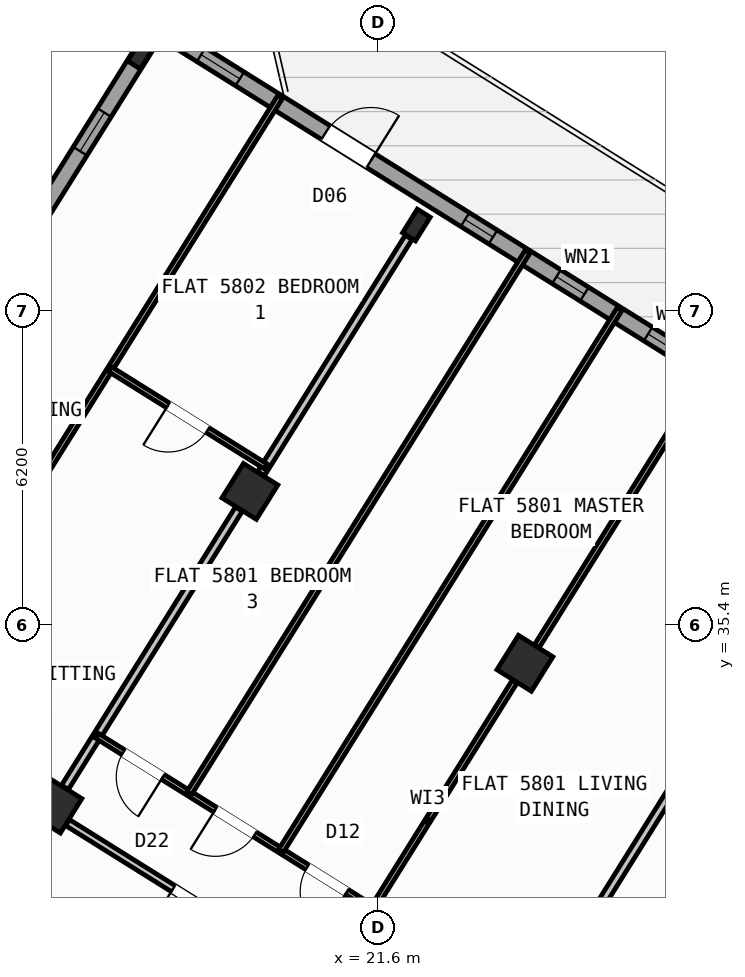
"""IFC4 building model, lengths in metres.
Left out: names, types, materials, properties, quantities, classifications, styles, units other than length and angle.
Written with IfcOpenShell. Run it as: python <this file> out.ifc"""

import sys

from ifc_helpers import new_model, si_unit, direction, frame, frame_2d, origin, origin_2d, place, context, subcontext, project, spatial, rectangle, hollow_rectangle, i_section, extrude, source, transform, mapped, element, fill, save


model = new_model("IFC4")
c1 = context("Model", 3, precision=1e-05, world=origin(), true_north=direction((0.0, 1.0)))
c2 = subcontext(c1, "Body", "Model", "MODEL_VIEW")
j1 = project(units=[si_unit("LENGTHUNIT", "METRE"), si_unit("PLANEANGLEUNIT", "RADIAN")], contexts=[c1])
p1 = place(None, origin())
s1 = spatial("IfcSite", under=j1, at=p1, CompositionType="ELEMENT")
p2 = place(p1, origin())
s2 = spatial("IfcBuilding", under=s1, at=p2, CompositionType="ELEMENT")
p3 = place(p2, frame((0.0, 0.0, 229.2)))
s3 = spatial("IfcBuildingStorey", under=s2, at=p3, CompositionType="ELEMENT", Elevation=229.2)
m1 = source(origin(), c2, "Body", "SweptSolid", [
    extrude(hollow_rectangle(XDim=0.8, YDim=0.8, WallThickness=0.032, at=origin_2d()), origin(), (0.0, 0.0, 1.0), 4.5),
])
p4 = place(p3, frame((24.5, 34.643, 0.0), z_axis=(0.0, 0.0, 1.0), x_axis=(-0.848048096156, 0.529919264233, 0.0)))
e1 = element("IfcColumn", 1, at=p4, inside=s3, PredefinedType="COLUMN", context=c2, shape_type="MappedRepresentation", body=[
    mapped(m1, transform((0.0, 0.0, 0.0), scale=1.0)),
])
m2 = source(origin(), c2, "Body", "SweptSolid", [
    extrude(i_section(OverallWidth=0.3, OverallDepth=0.55, WebThickness=0.015, FlangeThickness=0.029, at=origin_2d()), origin(), (0.0, 0.0, 1.0), 4.5),
])
p5 = place(p3, frame((22.358, 43.292, 0.0), z_axis=(0.0, 0.0, 1.0), x_axis=(-0.848048096156, 0.529919264233, 0.0)))
e2 = element("IfcColumn", 2, at=p5, inside=s3, PredefinedType="COLUMN", context=c2, shape_type="MappedRepresentation", body=[
    mapped(m2, transform((0.0, 0.0, 0.0), scale=1.0)),
])
for number, where, z_axis, x_axis in (
    (3, (19.073, 38.034, 0.0), (0.0, 0.0, 1.0), (-0.848, 0.53, 0.0)),
    (4, (15.205, 31.844, 0.0), (0.0, 0.0, 1.0), (-0.848, 0.53, 0.0)),
):
    element("IfcColumn", number, at=place(p3, frame(where, z_axis=z_axis, x_axis=x_axis)), inside=s3, PredefinedType="COLUMN", context=c2, shape_type="MappedRepresentation", body=[
        mapped(m1, transform((0.0, 0.0, 0.0), scale=1.0)),
    ])
p6 = place(p3, frame((16.931, 46.684, 0.0), z_axis=(0.0, 0.0, 1.0), x_axis=(-0.848048096156, 0.529919264233, 0.0)))
e5 = element("IfcColumn", 5, at=p6, inside=s3, PredefinedType="COLUMN", context=c2, shape_type="MappedRepresentation", body=[
    mapped(m2, transform((0.0, 0.0, 0.0), scale=1.0)),
])
p7 = place(p3, frame((5.7, 28.71, 0.0), z_axis=(0.0, 0.0, 1.0), x_axis=(0.529923711467, 0.8480453172, 0.0)))
e6 = element("IfcWall", 6, at=p7, inside=s3, PredefinedType="STANDARD", context=c2, shape_type="SweptSolid", body=[
    extrude(rectangle(XDim=21.587, YDim=0.32, at=frame_2d((10.794, 0.0))), origin(), (0.0, 0.0, 1.0), 2.395),
])
p8 = place(p7, frame((5.859, 0.0, 1.0)))
e7 = element("IfcOpeningElement", 7, at=p8, cuts=e6, PredefinedType="OPENING", context=c2, shape_type="SweptSolid", body=[
    extrude(rectangle(XDim=0.9, YDim=1.25, at=frame_2d((0.45, 0.625))), frame((0.0, 0.17, 0.0), z_axis=(0.0, -1.0, 0.0), x_axis=(1.0, 0.0, 0.0)), (0.0, 0.0, 1.0), 0.34),
])
p9 = place(p7, frame((9.444, 0.0, 1.0)))
e8 = element("IfcOpeningElement", 8, at=p9, cuts=e6, PredefinedType="OPENING", context=c2, shape_type="SweptSolid", body=[
    extrude(rectangle(XDim=0.9, YDim=1.25, at=frame_2d((0.45, 0.625))), frame((0.0, 0.17, 0.0), z_axis=(0.0, -1.0, 0.0), x_axis=(1.0, 0.0, 0.0)), (0.0, 0.0, 1.0), 0.34),
])
p10 = place(p7, frame((12.344, 0.0, 1.0)))
e9 = element("IfcOpeningElement", 9, at=p10, cuts=e6, PredefinedType="OPENING", context=c2, shape_type="SweptSolid", body=[
    extrude(rectangle(XDim=0.9, YDim=1.25, at=frame_2d((0.45, 0.625))), frame((0.0, 0.17, 0.0), z_axis=(0.0, -1.0, 0.0), x_axis=(1.0, 0.0, 0.0)), (0.0, 0.0, 1.0), 0.34),
])
p11 = place(p7, frame((16.5, 0.0, 1.0)))
e10 = element("IfcOpeningElement", 10, at=p11, cuts=e6, PredefinedType="OPENING", context=c2, shape_type="SweptSolid", body=[
    extrude(rectangle(XDim=0.9, YDim=1.25, at=frame_2d((0.45, 0.625))), frame((0.0, 0.17, 0.0), z_axis=(0.0, -1.0, 0.0), x_axis=(1.0, 0.0, 0.0)), (0.0, 0.0, 1.0), 0.34),
])
p12 = place(p7, frame((18.913, 0.0, 1.0)))
e11 = element("IfcOpeningElement", 11, at=p12, cuts=e6, PredefinedType="OPENING", context=c2, shape_type="SweptSolid", body=[
    extrude(rectangle(XDim=0.9, YDim=1.25, at=frame_2d((0.45, 0.625))), frame((0.0, 0.17, 0.0), z_axis=(0.0, -1.0, 0.0), x_axis=(1.0, 0.0, 0.0)), (0.0, 0.0, 1.0), 0.34),
])
p13 = place(p3, frame((17.424, 47.083, 0.0), z_axis=(0.0, 0.0, 1.0), x_axis=(0.848049927979, -0.529916332693, 0.0)))
e12 = element("IfcWall", 12, at=p13, inside=s3, PredefinedType="STANDARD", context=c2, shape_type="SweptSolid", body=[
    extrude(rectangle(XDim=29.223, YDim=0.32, at=frame_2d((14.612, 0.0))), origin(), (0.0, 0.0, 1.0), 4.22),
])
p14 = place(p13, frame((3.709, 0.0, 0.0)))
e13 = element("IfcOpeningElement", 13, at=p14, cuts=e12, PredefinedType="OPENING", context=c2, shape_type="SweptSolid", body=[
    extrude(rectangle(XDim=1.05, YDim=2.15, at=frame_2d((0.525, 1.075))), frame((0.0, 0.17, 0.0), z_axis=(0.0, -1.0, 0.0), x_axis=(1.0, 0.0, 0.0)), (0.0, 0.0, 1.0), 0.34),
])
p15 = place(p13, frame((0.809, 0.0, 1.0)))
e14 = element("IfcOpeningElement", 14, at=p15, cuts=e12, PredefinedType="OPENING", context=c2, shape_type="SweptSolid", body=[
    extrude(rectangle(XDim=0.9, YDim=1.25, at=frame_2d((0.45, 0.625))), frame((0.0, 0.17, 0.0), z_axis=(0.0, -1.0, 0.0), x_axis=(1.0, 0.0, 0.0)), (0.0, 0.0, 1.0), 0.34),
])
p16 = place(p13, frame((13.811, 0.0, 0.9)))
e15 = element("IfcOpeningElement", 15, at=p16, cuts=e12, PredefinedType="OPENING", context=c2, shape_type="SweptSolid", body=[
    extrude(rectangle(XDim=1.35, YDim=1.45, at=frame_2d((0.675, 0.725))), frame((0.0, 0.17, 0.0), z_axis=(0.0, -1.0, 0.0), x_axis=(1.0, 0.0, 0.0)), (0.0, 0.0, 1.0), 0.34),
])
p17 = place(p13, frame((17.254, 0.0, 1.0)))
e16 = element("IfcOpeningElement", 16, at=p17, cuts=e12, PredefinedType="OPENING", context=c2, shape_type="SweptSolid", body=[
    extrude(rectangle(XDim=0.9, YDim=1.25, at=frame_2d((0.45, 0.625))), frame((0.0, 0.17, 0.0), z_axis=(0.0, -1.0, 0.0), x_axis=(1.0, 0.0, 0.0)), (0.0, 0.0, 1.0), 0.34),
])
p18 = place(p13, frame((21.364, 0.0, 1.0)))
e17 = element("IfcOpeningElement", 17, at=p18, cuts=e12, PredefinedType="OPENING", context=c2, shape_type="SweptSolid", body=[
    extrude(rectangle(XDim=0.9, YDim=1.25, at=frame_2d((0.45, 0.625))), frame((0.0, 0.17, 0.0), z_axis=(0.0, -1.0, 0.0), x_axis=(1.0, 0.0, 0.0)), (0.0, 0.0, 1.0), 0.34),
])
p19 = place(p13, frame((26.003, 0.0, 1.0)))
e18 = element("IfcOpeningElement", 18, at=p19, cuts=e12, PredefinedType="OPENING", context=c2, shape_type="SweptSolid", body=[
    extrude(rectangle(XDim=0.9, YDim=1.25, at=frame_2d((0.45, 0.625))), frame((0.0, 0.17, 0.0), z_axis=(0.0, -1.0, 0.0), x_axis=(1.0, 0.0, 0.0)), (0.0, 0.0, 1.0), 0.34),
])
p20 = place(p13, frame((11.211, 0.0, 1.0)))
e19 = element("IfcOpeningElement", 19, at=p20, cuts=e12, PredefinedType="OPENING", context=c2, shape_type="SweptSolid", body=[
    extrude(rectangle(XDim=0.65, YDim=1.15, at=frame_2d((0.325, 0.575))), frame((0.0, 0.17, 0.0), z_axis=(0.0, -1.0, 0.0), x_axis=(1.0, 0.0, 0.0)), (0.0, 0.0, 1.0), 0.34),
])
p21 = place(p13, frame((9.079, 0.0, 1.0)))
e20 = element("IfcOpeningElement", 20, at=p21, cuts=e12, PredefinedType="OPENING", context=c2, shape_type="SweptSolid", body=[
    extrude(rectangle(XDim=0.65, YDim=1.15, at=frame_2d((0.325, 0.575))), frame((0.0, 0.17, 0.0), z_axis=(0.0, -1.0, 0.0), x_axis=(1.0, 0.0, 0.0)), (0.0, 0.0, 1.0), 0.34),
])
p22 = place(p13, frame((6.951, 0.0, 1.0)))
e21 = element("IfcOpeningElement", 21, at=p22, cuts=e12, PredefinedType="OPENING", context=c2, shape_type="SweptSolid", body=[
    extrude(rectangle(XDim=0.65, YDim=1.15, at=frame_2d((0.325, 0.575))), frame((0.0, 0.17, 0.0), z_axis=(0.0, -1.0, 0.0), x_axis=(1.0, 0.0, 0.0)), (0.0, 0.0, 1.0), 0.34),
])
p23 = place(p3, frame((31.239, 38.274, 0.0), z_axis=(0.0, 0.0, 1.0), x_axis=(-0.529921796515, -0.848046513806, 0.0)))
e22 = element("IfcWall", 22, at=p23, inside=s3, PredefinedType="PARTITIONING", context=c2, shape_type="SweptSolid", body=[
    extrude(rectangle(XDim=16.5, YDim=0.16, at=frame_2d((8.25, 0.0))), origin(), (0.0, 0.0, 1.0), 4.21),
])
p24 = place(p3, frame((22.495, 24.281, 0.0), z_axis=(0.0, 0.0, 1.0), x_axis=(-0.848052408131, 0.529912363569, 0.0)))
e23 = element("IfcWall", 23, at=p24, inside=s3, PredefinedType="PARTITIONING", context=c2, shape_type="SweptSolid", body=[
    extrude(rectangle(XDim=16.73, YDim=0.16, at=frame_2d((8.365, 0.0))), origin(), (0.0, 0.0, 1.0), 4.21),
])
p25 = place(p24, frame((1.385, 0.0, 0.0)))
e24 = element("IfcOpeningElement", 24, at=p25, cuts=e23, PredefinedType="OPENING", context=c2, shape_type="SweptSolid", body=[
    extrude(rectangle(XDim=1.0, YDim=2.1, at=frame_2d((0.5, 1.05))), frame((0.0, 0.09, 0.0), z_axis=(0.0, -1.0, 0.0), x_axis=(1.0, 0.0, 0.0)), (0.0, 0.0, 1.0), 0.18),
])
p26 = place(p24, frame((14.76, 0.0, 0.0)))
e25 = element("IfcOpeningElement", 25, at=p26, cuts=e23, PredefinedType="OPENING", context=c2, shape_type="SweptSolid", body=[
    extrude(rectangle(XDim=1.0, YDim=2.1, at=frame_2d((0.5, 1.05))), frame((0.0, 0.09, 0.0), z_axis=(0.0, -1.0, 0.0), x_axis=(1.0, 0.0, 0.0)), (0.0, 0.0, 1.0), 0.18),
])
p27 = place(p3, frame((21.329, 22.416, 0.0), z_axis=(0.0, 0.0, 1.0), x_axis=(-0.848052408131, 0.529912363569, 0.0)))
e26 = element("IfcWall", 26, at=p27, inside=s3, PredefinedType="PARTITIONING", context=c2, shape_type="SweptSolid", body=[
    extrude(rectangle(XDim=16.73, YDim=0.16, at=frame_2d((8.365, 0.0))), origin(), (0.0, 0.0, 1.0), 4.21),
])
p28 = place(p27, frame((1.505, 0.0, 0.0)))
e27 = element("IfcOpeningElement", 27, at=p28, cuts=e26, PredefinedType="OPENING", context=c2, shape_type="SweptSolid", body=[
    extrude(rectangle(XDim=1.0, YDim=2.1, at=frame_2d((0.5, 1.05))), frame((0.0, 0.09, 0.0), z_axis=(0.0, -1.0, 0.0), x_axis=(1.0, 0.0, 0.0)), (0.0, 0.0, 1.0), 0.18),
])
p29 = place(p27, frame((6.435, 0.0, 0.0)))
e28 = element("IfcOpeningElement", 28, at=p29, cuts=e26, PredefinedType="OPENING", context=c2, shape_type="SweptSolid", body=[
    extrude(rectangle(XDim=1.0, YDim=2.1, at=frame_2d((0.5, 1.05))), frame((0.0, 0.09, 0.0), z_axis=(0.0, -1.0, 0.0), x_axis=(1.0, 0.0, 0.0)), (0.0, 0.0, 1.0), 0.18),
])
p30 = place(p27, frame((12.784, 0.0, 0.0)))
e29 = element("IfcOpeningElement", 29, at=p30, cuts=e26, PredefinedType="OPENING", context=c2, shape_type="SweptSolid", body=[
    extrude(rectangle(XDim=1.0, YDim=2.1, at=frame_2d((0.5, 1.05))), frame((0.0, 0.09, 0.0), z_axis=(0.0, -1.0, 0.0), x_axis=(1.0, 0.0, 0.0)), (0.0, 0.0, 1.0), 0.18),
])
p31 = place(p3, frame((22.206, 43.049, 0.0), z_axis=(0.0, 0.0, 1.0), x_axis=(-0.529919150083, -0.848048167486, 0.0)))
e30 = element("IfcWall", 30, at=p31, inside=s3, PredefinedType="PARTITIONING", context=c2, shape_type="SweptSolid", body=[
    extrude(rectangle(XDim=5.501, YDim=0.16, at=frame_2d((2.75, 0.0))), origin(), (0.0, 0.0, 1.0), 4.21),
])
p32 = place(p3, frame((18.854, 37.685, 0.0), z_axis=(0.0, 0.0, 1.0), x_axis=(-0.529907440938, -0.848055484057, 0.0)))
e31 = element("IfcWall", 31, at=p32, inside=s3, PredefinedType="PARTITIONING", context=c2, shape_type="SweptSolid", body=[
    extrude(rectangle(XDim=6.476, YDim=0.16, at=frame_2d((3.238, 0.0))), origin(), (0.0, 0.0, 1.0), 2.395),
])
p33 = place(p3, frame((27.651, 39.647, 0.0), z_axis=(0.0, 0.0, 1.0), x_axis=(-0.529919150083, -0.848048167486, 0.0)))
e32 = element("IfcWall", 32, at=p33, inside=s3, PredefinedType="PARTITIONING", context=c2, shape_type="SweptSolid", body=[
    extrude(rectangle(XDim=5.501, YDim=0.11, at=frame_2d((2.75, 0.0))), origin(), (0.0, 0.0, 1.0), 4.21),
])
p34 = place(p3, frame((24.299, 34.283, 0.0), z_axis=(0.0, 0.0, 1.0), x_axis=(-0.529890499457, -0.848066069705, 0.0)))
e33 = element("IfcWall", 33, at=p34, inside=s3, PredefinedType="PARTITIONING", context=c2, shape_type="SweptSolid", body=[
    extrude(rectangle(XDim=6.476, YDim=0.11, at=frame_2d((3.238, 0.0))), origin(), (0.0, 0.0, 1.0), 2.395),
])
p35 = place(p34, frame((5.496, 0.0, 0.0)))
e34 = element("IfcOpeningElement", 34, at=p35, cuts=e33, PredefinedType="OPENING", context=c2, shape_type="SweptSolid", body=[
    extrude(rectangle(XDim=0.78, YDim=2.05, at=frame_2d((0.39, 1.025))), frame((0.0, 0.065, 0.0), z_axis=(0.0, -1.0, 0.0), x_axis=(1.0, 0.0, 0.0)), (0.0, 0.0, 1.0), 0.13),
])
p36 = place(p3, frame((20.203, 28.543, 0.0), z_axis=(0.0, 0.0, 1.0), x_axis=(-0.848049955116, 0.529916289265, 0.0)))
e35 = element("IfcWall", 35, at=p36, inside=s3, PredefinedType="PLUMBINGWALL", context=c2, shape_type="SweptSolid", body=[
    extrude(rectangle(XDim=5.576, YDim=0.14, at=frame_2d((2.788, 0.0))), origin(), (0.0, 0.0, 1.0), 3.745),
])
p37 = place(p36, frame((2.338, 0.0, 0.0)))
e36 = element("IfcOpeningElement", 36, at=p37, cuts=e35, PredefinedType="OPENING", context=c2, shape_type="SweptSolid", body=[
    extrude(rectangle(XDim=0.78, YDim=2.05, at=frame_2d((0.39, 1.025))), frame((0.0, 0.08, 0.0), z_axis=(0.0, -1.0, 0.0), x_axis=(1.0, 0.0, 0.0)), (0.0, 0.0, 1.0), 0.16),
])
p38 = place(p3, frame((21.502, 29.807, 0.0), z_axis=(0.0, 0.0, 1.0), x_axis=(-0.848051709137, 0.529913482212, 0.0)))
e37 = element("IfcWall", 37, at=p38, inside=s3, PredefinedType="PARTITIONING", context=c2, shape_type="SweptSolid", body=[
    extrude(rectangle(XDim=6.42, YDim=0.11, at=frame_2d((3.21, 0.0))), origin(), (0.0, 0.0, 1.0), 4.21),
])
p39 = place(p38, frame((0.61, 0.0, 0.0)))
e38 = element("IfcOpeningElement", 38, at=p39, cuts=e37, PredefinedType="OPENING", context=c2, shape_type="SweptSolid", body=[
    extrude(rectangle(XDim=0.92, YDim=2.08, at=frame_2d((0.46, 1.04))), frame((0.0, 0.065, 0.0), z_axis=(0.0, -1.0, 0.0), x_axis=(1.0, 0.0, 0.0)), (0.0, 0.0, 1.0), 0.13),
])
p40 = place(p38, frame((2.75, 0.0, 0.0)))
e39 = element("IfcOpeningElement", 39, at=p40, cuts=e37, PredefinedType="OPENING", context=c2, shape_type="SweptSolid", body=[
    extrude(rectangle(XDim=0.92, YDim=2.08, at=frame_2d((0.46, 1.04))), frame((0.0, 0.065, 0.0), z_axis=(0.0, -1.0, 0.0), x_axis=(1.0, 0.0, 0.0)), (0.0, 0.0, 1.0), 0.13),
])
p41 = place(p38, frame((4.89, 0.0, 0.0)))
e40 = element("IfcOpeningElement", 40, at=p41, cuts=e37, PredefinedType="OPENING", context=c2, shape_type="SweptSolid", body=[
    extrude(rectangle(XDim=0.92, YDim=2.08, at=frame_2d((0.46, 1.04))), frame((0.0, 0.065, 0.0), z_axis=(0.0, -1.0, 0.0), x_axis=(1.0, 0.0, 0.0)), (0.0, 0.0, 1.0), 0.13),
])
p42 = place(p3, frame((26.37, 41.635, 0.0), z_axis=(0.0, 0.0, 1.0), x_axis=(-0.529925845384, -0.848043983761, 0.0)))
e41 = element("IfcWall", 41, at=p42, inside=s3, PredefinedType="PARTITIONING", context=c2, shape_type="SweptSolid", body=[
    extrude(rectangle(XDim=12.61, YDim=0.11, at=frame_2d((6.305, 0.0))), origin(), (0.0, 0.0, 1.0), 3.895),
])
p43 = place(p3, frame((24.555, 42.769, 0.0), z_axis=(0.0, 0.0, 1.0), x_axis=(-0.529911921261, -0.848052684511, 0.0)))
e42 = element("IfcWall", 42, at=p43, inside=s3, PredefinedType="PARTITIONING", context=c2, shape_type="SweptSolid", body=[
    extrude(rectangle(XDim=12.61, YDim=0.11, at=frame_2d((6.305, 0.0))), origin(), (0.0, 0.0, 1.0), 3.895),
])
p44 = place(p3, frame((19.67, 45.821, 0.0), z_axis=(0.0, 0.0, 1.0), x_axis=(-0.529920421309, -0.848047373134, 0.0)))
e43 = element("IfcWall", 43, at=p44, inside=s3, PredefinedType="PARTITIONING", context=c2, shape_type="SweptSolid", body=[
    extrude(rectangle(XDim=16.77, YDim=0.11, at=frame_2d((8.385, 0.0))), origin(), (0.0, 0.0, 1.0), 4.21),
])
p45 = place(p44, frame((15.13, 0.0, 0.0)))
e44 = element("IfcOpeningElement", 44, at=p45, cuts=e43, PredefinedType="OPENING", context=c2, shape_type="SweptSolid", body=[
    extrude(rectangle(XDim=0.78, YDim=2.05, at=frame_2d((0.39, 1.025))), frame((0.0, 0.065, 0.0), z_axis=(0.0, -1.0, 0.0), x_axis=(1.0, 0.0, 0.0)), (0.0, 0.0, 1.0), 0.13),
])
p46 = place(p44, frame((9.884, 0.0, 0.0)))
e45 = element("IfcOpeningElement", 45, at=p46, cuts=e43, PredefinedType="OPENING", context=c2, shape_type="SweptSolid", body=[
    extrude(rectangle(XDim=0.92, YDim=2.08, at=frame_2d((0.46, 1.04))), frame((0.0, 0.065, 0.0), z_axis=(0.0, -1.0, 0.0), x_axis=(1.0, 0.0, 0.0)), (0.0, 0.0, 1.0), 0.13),
])
p47 = place(p3, frame((19.382, 38.529, 0.0), z_axis=(0.0, 0.0, 1.0), x_axis=(-0.848051346257, 0.52991406295, 0.0)))
e46 = element("IfcWall", 46, at=p47, inside=s3, PredefinedType="PARTITIONING", context=c2, shape_type="SweptSolid", body=[
    extrude(rectangle(XDim=3.62, YDim=0.11, at=frame_2d((1.81, 0.0))), origin(), (0.0, 0.0, 1.0), 4.21),
])
p48 = place(p47, frame((1.35, 0.0, 0.0)))
e47 = element("IfcOpeningElement", 47, at=p48, cuts=e46, PredefinedType="OPENING", context=c2, shape_type="SweptSolid", body=[
    extrude(rectangle(XDim=0.92, YDim=2.08, at=frame_2d((0.46, 1.04))), frame((0.0, 0.065, 0.0), z_axis=(0.0, -1.0, 0.0), x_axis=(1.0, 0.0, 0.0)), (0.0, 0.0, 1.0), 0.13),
])
m3 = source(origin(), c2, "Body", "SweptSolid", [
    extrude(rectangle(XDim=1.05, YDim=2.15, at=frame_2d((0.525, 1.075))), frame((0.0, 0.025, 0.0), z_axis=(0.0, -1.0, 0.0), x_axis=(1.0, 0.0, 0.0)), (0.0, 0.0, 1.0), 0.05),
])
p49 = place(p14, origin())
e48 = element("IfcDoor", 48, at=p49, inside=s3, OperationType="SINGLE_SWING_RIGHT", PredefinedType="DOOR", context=c2, shape_type="MappedRepresentation", body=[
    mapped(m3, transform((0.0, 0.0, 0.0), scale=1.0)),
])
fill(e13, e48)
m4 = source(origin(), c2, "Body", "SweptSolid", [
    extrude(rectangle(XDim=0.9, YDim=1.25, at=frame_2d((0.45, 0.625))), frame((0.0, 0.03, 0.0), z_axis=(0.0, -1.0, 0.0), x_axis=(1.0, 0.0, 0.0)), (0.0, 0.0, 1.0), 0.06),
])
p50 = place(p12, origin())
e49 = element("IfcWindow", 49, at=p50, inside=s3, PartitioningType="SINGLE_PANEL", PredefinedType="WINDOW", context=c2, shape_type="MappedRepresentation", body=[
    mapped(m4, transform((0.0, 0.0, 0.0), scale=1.0)),
])
fill(e11, e49)
p51 = place(p15, origin())
e50 = element("IfcWindow", 50, at=p51, inside=s3, PartitioningType="SINGLE_PANEL", PredefinedType="WINDOW", context=c2, shape_type="MappedRepresentation", body=[
    mapped(m4, transform((0.0, 0.0, 0.0), scale=1.0)),
])
fill(e14, e50)
m5 = source(origin(), c2, "Body", "SweptSolid", [
    extrude(rectangle(XDim=0.65, YDim=1.15, at=frame_2d((0.325, 0.575))), frame((0.0, 0.03, 0.0), z_axis=(0.0, -1.0, 0.0), x_axis=(1.0, 0.0, 0.0)), (0.0, 0.0, 1.0), 0.06),
])
p52 = place(p20, origin())
e51 = element("IfcWindow", 51, at=p52, inside=s3, PartitioningType="SINGLE_PANEL", PredefinedType="WINDOW", context=c2, shape_type="MappedRepresentation", body=[
    mapped(m5, transform((0.0, 0.0, 0.0), scale=1.0)),
])
fill(e19, e51)
p53 = place(p21, origin())
e52 = element("IfcWindow", 52, at=p53, inside=s3, PartitioningType="SINGLE_PANEL", PredefinedType="WINDOW", context=c2, shape_type="MappedRepresentation", body=[
    mapped(m5, transform((0.0, 0.0, 0.0), scale=1.0)),
])
fill(e20, e52)
p54 = place(p22, origin())
e53 = element("IfcWindow", 53, at=p54, inside=s3, PartitioningType="SINGLE_PANEL", PredefinedType="WINDOW", context=c2, shape_type="MappedRepresentation", body=[
    mapped(m5, transform((0.0, 0.0, 0.0), scale=1.0)),
])
fill(e21, e53)
m6 = source(origin(), c2, "Body", "SweptSolid", [
    extrude(rectangle(XDim=0.78, YDim=2.05, at=frame_2d((0.39, 1.025))), frame((0.0, 0.025, 0.0), z_axis=(0.0, -1.0, 0.0), x_axis=(1.0, 0.0, 0.0)), (0.0, 0.0, 1.0), 0.05),
])
p55 = place(p37, origin())
e54 = element("IfcDoor", 54, at=p55, inside=s3, OperationType="SINGLE_SWING_RIGHT", PredefinedType="DOOR", context=c2, shape_type="MappedRepresentation", body=[
    mapped(m6, transform((0.0, 0.0, 0.0), scale=1.0)),
])
fill(e36, e54)
m7 = source(origin(), c2, "Body", "SweptSolid", [
    extrude(rectangle(XDim=0.92, YDim=2.08, at=frame_2d((0.46, 1.04))), frame((0.0, 0.025, 0.0), z_axis=(0.0, -1.0, 0.0), x_axis=(1.0, 0.0, 0.0)), (0.0, 0.0, 1.0), 0.05),
])
p56 = place(p39, origin())
e55 = element("IfcDoor", 55, at=p56, inside=s3, OperationType="SINGLE_SWING_LEFT", PredefinedType="DOOR", context=c2, shape_type="MappedRepresentation", body=[
    mapped(m7, transform((0.0, 0.0, 0.0), scale=1.0)),
])
fill(e38, e55)
p57 = place(p40, origin())
e56 = element("IfcDoor", 56, at=p57, inside=s3, OperationType="SINGLE_SWING_RIGHT", PredefinedType="DOOR", context=c2, shape_type="MappedRepresentation", body=[
    mapped(m7, transform((0.0, 0.0, 0.0), scale=1.0)),
])
fill(e39, e56)
p58 = place(p41, origin())
e57 = element("IfcDoor", 57, at=p58, inside=s3, OperationType="SINGLE_SWING_LEFT", PredefinedType="DOOR", context=c2, shape_type="MappedRepresentation", body=[
    mapped(m7, transform((0.0, 0.0, 0.0), scale=1.0)),
])
fill(e40, e57)
p59 = place(p48, origin())
e58 = element("IfcDoor", 58, at=p59, inside=s3, OperationType="SINGLE_SWING_RIGHT", PredefinedType="DOOR", context=c2, shape_type="MappedRepresentation", body=[
    mapped(m7, transform((0.0, 0.0, 0.0), scale=1.0)),
])
fill(e47, e58)
save(model, sys.argv[1])
